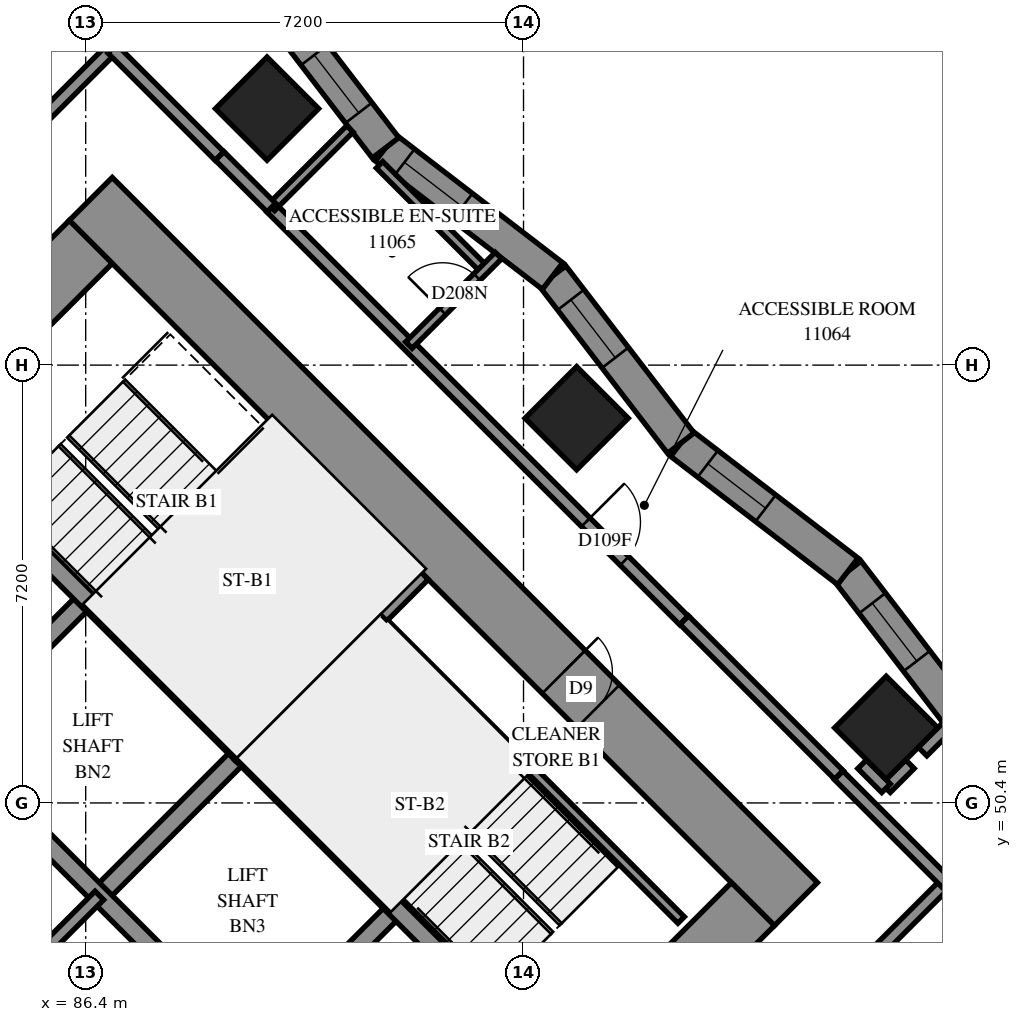
"""IFC4 building model, lengths in metres.
Left out: names, types, materials, properties, quantities, classifications, styles, units other than length and angle.
Written with IfcOpenShell. Run it as: python <this file> out.ifc"""

import sys

from ifc_helpers import new_model, si_unit, direction, frame, frame_2d, origin, origin_2d, place, context, subcontext, project, spatial, polyline, rectangle, outline, extrude, element, fill, save


model = new_model("IFC4")
c1 = context("Model", 3, precision=1e-05, world=origin(), true_north=direction((0.0, 1.0)))
c2 = subcontext(c1, "Body", "Model", "MODEL_VIEW")
j1 = project(units=[si_unit("LENGTHUNIT", "METRE"), si_unit("PLANEANGLEUNIT", "RADIAN")], contexts=[c1])
p1 = place(None, origin())
s1 = spatial("IfcSite", under=j1, at=p1, CompositionType="ELEMENT")
p2 = place(p1, origin())
s2 = spatial("IfcBuilding", under=s1, at=p2, CompositionType="ELEMENT")
p3 = place(p2, frame((0.0, 0.0, 44.0)))
s3 = spatial("IfcBuildingStorey", under=s2, at=p3, CompositionType="ELEMENT", Elevation=44.0)
for number, where, z_axis, x_axis in (
    (1, (89.382, 61.818, 0.0), (0.0, 0.0, 1.0), (0.707, -0.707, 0.0)),
    (2, (94.474, 56.727, 0.0), (0.0, 0.0, 1.0), (0.707, -0.707, 0.0)),
    (3, (99.565, 51.635, 0.0), (0.0, 0.0, 1.0), (0.707, -0.707, 0.0)),
):
    element("IfcColumn", number, at=place(p3, frame(where, z_axis=z_axis, x_axis=x_axis)), inside=s3, PredefinedType="COLUMN", context=c2, shape_type="SweptSolid", body=[
        extrude(rectangle(XDim=1.2, YDim=1.2, at=origin_2d()), origin(), (0.0, 0.0, 1.0), 3.1),
    ])
p4 = place(p3, frame((75.594, 49.443, -0.3), z_axis=(0.0, 0.0, 1.0), x_axis=(0.7071037324, -0.70710983, 0.0)))
e4 = element("IfcWall", 4, at=p4, inside=s3, PredefinedType="SHEAR", context=c2, shape_type="SweptSolid", body=[
    extrude(rectangle(XDim=16.4, YDim=1.0, at=frame_2d((8.2, 0.0))), origin(), (0.0, 0.0, 1.0), 2.7),
])
p5 = place(p3, frame((86.483, 60.333, -0.3), z_axis=(0.0, 0.0, 1.0), x_axis=(0.70710983, -0.7071037324, 0.0)))
e5 = element("IfcWall", 5, at=p5, inside=s3, PredefinedType="SHEAR", context=c2, shape_type="SweptSolid", body=[
    extrude(rectangle(XDim=16.4, YDim=1.0, at=frame_2d((8.2, 0.0))), origin(), (0.0, 0.0, 1.0), 2.7),
])
p6 = place(p5, frame((11.0, 0.0, 0.3)))
e6 = element("IfcOpeningElement", 6, at=p6, cuts=e5, PredefinedType="OPENING", context=c2, shape_type="SweptSolid", body=[
    extrude(rectangle(XDim=0.8, YDim=2.1, at=frame_2d((0.4, 1.05))), frame((0.0, 0.51, 0.0), z_axis=(0.0, -1.0, 0.0), x_axis=(1.0, 0.0, 0.0)), (0.0, 0.0, 1.0), 1.02),
])
p7 = place(p3, frame((76.301, 49.443, -0.3), z_axis=(0.0, 0.0, 1.0), x_axis=(0.7071067812, 0.7071067812, 0.0)))
e7 = element("IfcWall", 7, at=p7, inside=s3, PredefinedType="SHEAR", context=c2, shape_type="SweptSolid", body=[
    extrude(rectangle(XDim=14.4, YDim=1.0, at=frame_2d((7.2, 0.0))), origin(), (0.0, 0.0, 1.0), 2.7),
])
p8 = place(p7, frame((4.55, 0.0, 0.3)))
e8 = element("IfcOpeningElement", 8, at=p8, cuts=e7, PredefinedType="OPENING", context=c2, shape_type="SweptSolid", body=[
    extrude(rectangle(XDim=1.1, YDim=2.1, at=frame_2d((0.55, 1.05))), frame((0.0, 0.51, 0.0), z_axis=(0.0, -1.0, 0.0), x_axis=(1.0, 0.0, 0.0)), (0.0, 0.0, 1.0), 1.02),
])
p9 = place(p7, frame((11.35, 0.0, 0.3)))
e9 = element("IfcOpeningElement", 9, at=p9, cuts=e7, PredefinedType="OPENING", context=c2, shape_type="SweptSolid", body=[
    extrude(rectangle(XDim=1.1, YDim=2.1, at=frame_2d((0.55, 1.05))), frame((0.0, 0.51, 0.0), z_axis=(0.0, -1.0, 0.0), x_axis=(1.0, 0.0, 0.0)), (0.0, 0.0, 1.0), 1.02),
])
p10 = place(p3, frame((87.19, 38.554, -0.3), z_axis=(0.0, 0.0, 1.0), x_axis=(0.707103309, 0.7071102534, 0.0)))
e10 = element("IfcWall", 10, at=p10, inside=s3, PredefinedType="SHEAR", context=c2, shape_type="SweptSolid", body=[
    extrude(rectangle(XDim=14.4, YDim=1.0, at=frame_2d((7.2, 0.0))), origin(), (0.0, 0.0, 1.0), 2.7),
])
p11 = place(p10, frame((4.55, 0.0, 0.3)))
e11 = element("IfcOpeningElement", 11, at=p11, cuts=e10, PredefinedType="OPENING", context=c2, shape_type="SweptSolid", body=[
    extrude(rectangle(XDim=1.1, YDim=2.1, at=frame_2d((0.55, 1.05))), frame((0.0, 0.51, 0.0), z_axis=(0.0, -1.0, 0.0), x_axis=(1.0, 0.0, 0.0)), (0.0, 0.0, 1.0), 1.02),
])
p12 = place(p10, frame((11.35, 0.0, 0.3)))
e12 = element("IfcOpeningElement", 12, at=p12, cuts=e10, PredefinedType="OPENING", context=c2, shape_type="SweptSolid", body=[
    extrude(rectangle(XDim=1.1, YDim=2.1, at=frame_2d((0.55, 1.05))), frame((0.0, 0.51, 0.0), z_axis=(0.0, -1.0, 0.0), x_axis=(1.0, 0.0, 0.0)), (0.0, 0.0, 1.0), 1.02),
])
p13 = place(p3, frame((84.079, 51.423, 0.0), z_axis=(0.0, 0.0, 1.0), x_axis=(0.7071219326, 0.7070916295, 0.0)))
e13 = element("IfcWall", 13, at=p13, inside=s3, PredefinedType="SOLIDWALL", context=c2, shape_type="SweptSolid", body=[
    extrude(rectangle(XDim=3.3, YDim=0.3, at=frame_2d((1.65, 0.0))), origin(), (0.0, 0.0, 1.0), 3.1),
])
for number, where, z_axis, x_axis in (
    (14, (86.625, 48.878, 0.0), (0.0, 0.0, 1.0), (0.707, 0.707, 0.0)),
    (15, (89.17, 46.332, 0.0), (0.0, 0.0, 1.0), (0.707, 0.707, 0.0)),
):
    element("IfcWall", number, at=place(p3, frame(where, z_axis=z_axis, x_axis=x_axis)), inside=s3, PredefinedType="SOLIDWALL", context=c2, shape_type="SweptSolid", body=[
        extrude(rectangle(XDim=3.3, YDim=0.3, at=frame_2d((1.65, 0.0))), origin(), (0.0, 0.0, 1.0), 3.1),
    ])
p14 = place(p3, frame((78.988, 51.423, 0.0), z_axis=(0.0, 0.0, 1.0), x_axis=(0.7071067812, -0.7071067812, 0.0)))
e16 = element("IfcWall", 16, at=p14, inside=s3, PredefinedType="SOLIDWALL", context=c2, shape_type="SweptSolid", body=[
    extrude(rectangle(XDim=14.4, YDim=0.3, at=frame_2d((7.2, 0.0))), origin(), (0.0, 0.0, 1.0), 3.1),
])
p15 = place(p14, frame((1.25, 0.0, 0.0)))
e17 = element("IfcOpeningElement", 17, at=p15, cuts=e16, PredefinedType="OPENING", context=c2, shape_type="SweptSolid", body=[
    extrude(rectangle(XDim=1.1, YDim=2.1, at=frame_2d((0.55, 1.05))), frame((0.0, 0.16, 0.0), z_axis=(0.0, -1.0, 0.0), x_axis=(1.0, 0.0, 0.0)), (0.0, 0.0, 1.0), 0.32),
])
p16 = place(p14, frame((4.85, 0.0, 0.0)))
e18 = element("IfcOpeningElement", 18, at=p16, cuts=e16, PredefinedType="OPENING", context=c2, shape_type="SweptSolid", body=[
    extrude(rectangle(XDim=1.1, YDim=2.1, at=frame_2d((0.55, 1.05))), frame((0.0, 0.16, 0.0), z_axis=(0.0, -1.0, 0.0), x_axis=(1.0, 0.0, 0.0)), (0.0, 0.0, 1.0), 0.32),
])
p17 = place(p14, frame((8.45, 0.0, 0.0)))
e19 = element("IfcOpeningElement", 19, at=p17, cuts=e16, PredefinedType="OPENING", context=c2, shape_type="SweptSolid", body=[
    extrude(rectangle(XDim=1.1, YDim=2.1, at=frame_2d((0.55, 1.05))), frame((0.0, 0.16, 0.0), z_axis=(0.0, -1.0, 0.0), x_axis=(1.0, 0.0, 0.0)), (0.0, 0.0, 1.0), 0.32),
])
p18 = place(p14, frame((12.05, 0.0, 0.0)))
e20 = element("IfcOpeningElement", 20, at=p18, cuts=e16, PredefinedType="OPENING", context=c2, shape_type="SweptSolid", body=[
    extrude(rectangle(XDim=1.1, YDim=2.1, at=frame_2d((0.55, 1.05))), frame((0.0, 0.16, 0.0), z_axis=(0.0, -1.0, 0.0), x_axis=(1.0, 0.0, 0.0)), (0.0, 0.0, 1.0), 0.32),
])
p19 = place(p3, frame((81.534, 53.969, 0.0), z_axis=(0.0, 0.0, 1.0), x_axis=(0.707103309, -0.7071102534, 0.0)))
e21 = element("IfcWall", 21, at=p19, inside=s3, PredefinedType="SOLIDWALL", context=c2, shape_type="SweptSolid", body=[
    extrude(rectangle(XDim=14.4, YDim=0.3, at=frame_2d((7.2, 0.0))), origin(), (0.0, 0.0, 1.0), 3.1),
])
p20 = place(p19, frame((12.05, 0.0, 0.0)))
e22 = element("IfcOpeningElement", 22, at=p20, cuts=e21, PredefinedType="OPENING", context=c2, shape_type="SweptSolid", body=[
    extrude(rectangle(XDim=1.1, YDim=2.1, at=frame_2d((0.55, 1.05))), frame((0.0, 0.16, 0.0), z_axis=(0.0, -1.0, 0.0), x_axis=(1.0, 0.0, 0.0)), (0.0, 0.0, 1.0), 0.32),
])
for number, where, z_axis, x_axis in (
    (23, (83.867, 56.302, 0.0), (0.0, 0.0, 1.0), (0.707, -0.707, 0.0)),
    (24, (88.958, 51.211, 0.0), (0.0, 0.0, 1.0), (0.707, -0.707, 0.0)),
):
    element("IfcWall", number, at=place(p3, frame(where, z_axis=z_axis, x_axis=x_axis)), inside=s3, PredefinedType="SOLIDWALL", context=c2, shape_type="SweptSolid", body=[
        extrude(rectangle(XDim=7.2, YDim=0.3, at=frame_2d((3.6, 0.0))), origin(), (0.0, 0.0, 1.0), 3.1),
    ])
p21 = place(p3, frame((88.958, 51.211, 0.0), z_axis=(0.0, 0.0, 1.0), x_axis=(0.7071067812, 0.7071067812, 0.0)))
e25 = element("IfcWall", 25, at=p21, inside=s3, PredefinedType="SOLIDWALL", context=c2, shape_type="SweptSolid", body=[
    extrude(rectangle(XDim=4.2, YDim=0.3, at=frame_2d((2.1, 0.0))), origin(), (0.0, 0.0, 1.0), 3.1),
])
p22 = place(p3, frame((101.042, 51.462, 0.0), z_axis=(0.0, 0.0, 1.0), x_axis=(-0.6089722022, 0.7931915638, 0.0)))
e26 = element("IfcWall", 26, at=p22, inside=s3, PredefinedType="SOLIDWALL", context=c2, shape_type="SweptSolid", body=[
    extrude(outline(polyline([(0.036, -0.275), (3.499, -0.275), (3.427, 0.275), (-0.036, 0.275), (0.036, -0.275)])), origin(), (0.0, 0.0, 1.0), 3.1),
])
p23 = place(p22, frame((1.602, 0.0, 0.5)))
e27 = element("IfcOpeningElement", 27, at=p23, cuts=e26, PredefinedType="OPENING", context=c2, shape_type="SweptSolid", body=[
    extrude(rectangle(XDim=1.2, YDim=2.45, at=frame_2d((0.6, 1.225))), frame((0.0, 0.285, 0.0), z_axis=(0.0, -1.0, 0.0), x_axis=(1.0, 0.0, 0.0)), (0.0, 0.0, 1.0), 0.57),
])
p24 = place(p3, frame((98.934, 54.209, 0.0), z_axis=(0.0, 0.0, 1.0), x_axis=(-0.7931776144, 0.6089903711, 0.0)))
e28 = element("IfcWall", 28, at=p24, inside=s3, PredefinedType="SOLIDWALL", context=c2, shape_type="SweptSolid", body=[
    extrude(outline(polyline([(-0.036, -0.275), (3.427, -0.275), (3.499, 0.275), (0.036, 0.275), (-0.036, -0.275)])), origin(), (0.0, 0.0, 1.0), 3.1),
])
p25 = place(p24, frame((1.704, 0.0, 0.5)))
e29 = element("IfcOpeningElement", 29, at=p25, cuts=e28, PredefinedType="OPENING", context=c2, shape_type="SweptSolid", body=[
    extrude(rectangle(XDim=1.2, YDim=2.45, at=frame_2d((0.6, 1.225))), frame((0.0, 0.285, 0.0), z_axis=(0.0, -1.0, 0.0), x_axis=(1.0, 0.0, 0.0)), (0.0, 0.0, 1.0), 0.57),
])
p26 = place(p3, frame((96.187, 56.318, 0.0), z_axis=(0.0, 0.0, 1.0), x_axis=(-0.6089903711, 0.7931776144, 0.0)))
e30 = element("IfcWall", 30, at=p26, inside=s3, PredefinedType="SOLIDWALL", context=c2, shape_type="SweptSolid", body=[
    extrude(outline(polyline([(0.036, -0.275), (3.499, -0.275), (3.427, 0.275), (-0.036, 0.275), (0.036, -0.275)])), origin(), (0.0, 0.0, 1.0), 3.1),
])
p27 = place(p26, frame((1.77, 0.0, 0.5)))
e31 = element("IfcOpeningElement", 31, at=p27, cuts=e30, PredefinedType="OPENING", context=c2, shape_type="SweptSolid", body=[
    extrude(rectangle(XDim=1.2, YDim=2.45, at=frame_2d((0.6, 1.225))), frame((0.0, 0.285, 0.0), z_axis=(0.0, -1.0, 0.0), x_axis=(1.0, 0.0, 0.0)), (0.0, 0.0, 1.0), 0.57),
])
p28 = place(p3, frame((94.078, 59.065, 0.0), z_axis=(0.0, 0.0, 1.0), x_axis=(-0.7931776144, 0.6089903711, 0.0)))
e32 = element("IfcWall", 32, at=p28, inside=s3, PredefinedType="SOLIDWALL", context=c2, shape_type="SweptSolid", body=[
    extrude(outline(polyline([(-0.036, -0.275), (3.427, -0.275), (3.499, 0.275), (0.036, 0.275), (-0.036, -0.275)])), origin(), (0.0, 0.0, 1.0), 3.1),
])
p29 = place(p28, frame((1.872, 0.0, 0.5)))
e33 = element("IfcOpeningElement", 33, at=p29, cuts=e32, PredefinedType="OPENING", context=c2, shape_type="SweptSolid", body=[
    extrude(rectangle(XDim=1.2, YDim=2.45, at=frame_2d((0.6, 1.225))), frame((0.0, 0.285, 0.0), z_axis=(0.0, -1.0, 0.0), x_axis=(1.0, 0.0, 0.0)), (0.0, 0.0, 1.0), 0.57),
])
p30 = place(p3, frame((91.332, 61.173, 0.0), z_axis=(0.0, 0.0, 1.0), x_axis=(-0.6089903711, 0.7931776144, 0.0)))
e34 = element("IfcWall", 34, at=p30, inside=s3, PredefinedType="SOLIDWALL", context=c2, shape_type="SweptSolid", body=[
    extrude(outline(polyline([(0.036, -0.275), (3.499, -0.275), (3.427, 0.275), (-0.036, 0.275), (0.036, -0.275)])), origin(), (0.0, 0.0, 1.0), 3.1),
])
p31 = place(p30, frame((0.725, 0.0, 0.5)))
e35 = element("IfcOpeningElement", 35, at=p31, cuts=e34, PredefinedType="OPENING", context=c2, shape_type="SweptSolid", body=[
    extrude(rectangle(XDim=1.2, YDim=2.45, at=frame_2d((0.6, 1.225))), frame((0.0, 0.285, 0.0), z_axis=(0.0, -1.0, 0.0), x_axis=(1.0, 0.0, 0.0)), (0.0, 0.0, 1.0), 0.57),
])
p32 = place(p3, frame((91.313, 53.354, 0.0), z_axis=(0.0, 0.0, 1.0), x_axis=(0.7071140275, -0.7070995348, 0.0)))
e36 = element("IfcWall", 36, at=p32, inside=s3, PredefinedType="PARTITIONING", context=c2, shape_type="SweptSolid", body=[
    extrude(rectangle(XDim=6.9, YDim=0.15, at=frame_2d((3.45, 0.0))), origin(), (0.0, 0.0, 1.0), 3.1),
])
p33 = place(p3, frame((84.079, 46.332, 0.0), z_axis=(0.0, 0.0, 1.0), x_axis=(0.7071067812, 0.7071067812, 0.0)))
e37 = element("IfcWall", 37, at=p33, inside=s3, PredefinedType="PARTITIONING", context=c2, shape_type="SweptSolid", body=[
    extrude(rectangle(XDim=3.6, YDim=0.2, at=frame_2d((1.8, 0.0))), origin(), (0.0, 0.0, 1.0), 3.1),
])
p34 = place(p3, frame((94.367, 41.349, 0.0), z_axis=(0.0, 0.0, 1.0), x_axis=(0.7071109781, 0.7071025843, 0.0)))
e38 = element("IfcWall", 38, at=p34, inside=s3, PredefinedType="PARTITIONING", context=c2, shape_type="SweptSolid", body=[
    extrude(rectangle(XDim=11.914, YDim=0.2, at=frame_2d((5.957, 0.0))), origin(), (0.0, 0.0, 1.0), 3.1),
])
p35 = place(p3, frame((79.871, 55.843, 0.0), z_axis=(0.0, 0.0, 1.0), x_axis=(0.7071067812, 0.7071067812, 0.0)))
e39 = element("IfcWall", 39, at=p35, inside=s3, PredefinedType="PARTITIONING", context=c2, shape_type="SweptSolid", body=[
    extrude(rectangle(XDim=9.85, YDim=0.2, at=frame_2d((4.925, 0.0))), origin(), (0.0, 0.0, 1.0), 3.1),
])
p36 = place(p35, frame((1.135, 0.0, 0.0)))
e40 = element("IfcOpeningElement", 40, at=p36, cuts=e39, PredefinedType="OPENING", context=c2, shape_type="SweptSolid", body=[
    extrude(rectangle(XDim=1.0, YDim=2.1, at=frame_2d((0.5, 1.05))), frame((0.0, 0.11, 0.0), z_axis=(0.0, -1.0, 0.0), x_axis=(1.0, 0.0, 0.0)), (0.0, 0.0, 1.0), 0.22),
])
p37 = place(p3, frame((93.59, 42.126, 0.0), z_axis=(0.0, 0.0, 1.0), x_axis=(0.7071067812, 0.7071067812, 0.0)))
e41 = element("IfcWall", 41, at=p37, inside=s3, PredefinedType="PARTITIONING", context=c2, shape_type="SweptSolid", body=[
    extrude(rectangle(XDim=9.849, YDim=0.2, at=frame_2d((4.924, 0.0))), origin(), (0.0, 0.0, 1.0), 3.1),
])
p38 = place(p37, frame((0.148, 0.0, 0.0)))
e42 = element("IfcOpeningElement", 42, at=p38, cuts=e41, PredefinedType="OPENING", context=c2, shape_type="SweptSolid", body=[
    extrude(rectangle(XDim=1.0, YDim=2.1, at=frame_2d((0.5, 1.05))), frame((0.0, 0.11, 0.0), z_axis=(0.0, -1.0, 0.0), x_axis=(1.0, 0.0, 0.0)), (0.0, 0.0, 1.0), 0.22),
])
p39 = place(p3, frame((89.451, 60.189, 0.0), z_axis=(0.0, 0.0, 1.0), x_axis=(0.7071796965, -0.7070338583, 0.0)))
e43 = element("IfcWall", 43, at=p39, inside=s3, PredefinedType="PARTITIONING", context=c2, shape_type="SweptSolid", body=[
    extrude(rectangle(XDim=9.6, YDim=0.2, at=frame_2d((4.8, 0.0))), origin(), (0.0, 0.0, 1.0), 3.1),
])
p40 = place(p39, frame((7.315, 0.0, 0.0)))
e44 = element("IfcOpeningElement", 44, at=p40, cuts=e43, PredefinedType="OPENING", context=c2, shape_type="SweptSolid", body=[
    extrude(rectangle(XDim=0.9, YDim=2.1, at=frame_2d((0.45, 1.05))), frame((0.0, 0.11, 0.0), z_axis=(0.0, -1.0, 0.0), x_axis=(1.0, 0.0, 0.0)), (0.0, 0.0, 1.0), 0.22),
])
p41 = place(p3, frame((96.244, 53.406, 0.0), z_axis=(0.0, 0.0, 1.0), x_axis=(0.7068288851, -0.7073845681, 0.0)))
e45 = element("IfcWall", 45, at=p41, inside=s3, PredefinedType="PARTITIONING", context=c2, shape_type="SweptSolid", body=[
    extrude(rectangle(XDim=3.599, YDim=0.2, at=frame_2d((1.8, 0.0))), origin(), (0.0, 0.0, 1.0), 3.1),
])
p42 = place(p3, frame((98.783, 50.855, 0.0), z_axis=(0.0, 0.0, 1.0), x_axis=(0.7071067812, -0.7071067812, 0.0)))
e46 = element("IfcWall", 46, at=p42, inside=s3, PredefinedType="PARTITIONING", context=c2, shape_type="SweptSolid", body=[
    extrude(rectangle(XDim=2.5, YDim=0.2, at=frame_2d((1.25, 0.0))), origin(), (0.0, 0.0, 1.0), 3.1),
])
p43 = place(p3, frame((86.835, 62.803, 0.0), z_axis=(0.0, 0.0, 1.0), x_axis=(0.7071067812, -0.7071067812, 0.0)))
e47 = element("IfcWall", 47, at=p43, inside=s3, PredefinedType="PARTITIONING", context=c2, shape_type="SweptSolid", body=[
    extrude(rectangle(XDim=2.498, YDim=0.2, at=frame_2d((1.249, 0.0))), origin(), (0.0, 0.0, 1.0), 3.1),
])
p44 = place(p3, frame((91.233, 60.894, 0.0), z_axis=(0.0, 0.0, 1.0), x_axis=(0.7071272785, -0.7070862833, 0.0)))
e48 = element("IfcWall", 48, at=p44, inside=s3, PredefinedType="PARTITIONING", context=c2, shape_type="SweptSolid", body=[
    extrude(rectangle(XDim=2.439, YDim=0.15, at=frame_2d((1.22, 0.0))), origin(), (0.0, 0.0, 1.0), 3.1),
])
p45 = place(p3, frame((91.715, 57.929, 0.0), z_axis=(0.0, 0.0, 1.0), x_axis=(0.7070827712, 0.7071307904, 0.0)))
e49 = element("IfcWall", 49, at=p45, inside=s3, PredefinedType="PARTITIONING", context=c2, shape_type="SweptSolid", body=[
    extrude(rectangle(XDim=2.083, YDim=0.15, at=frame_2d((1.041, 0.0))), origin(), (0.0, 0.0, 1.0), 3.1),
])
p46 = place(p45, frame((0.784, 0.0, 0.0)))
e50 = element("IfcOpeningElement", 50, at=p46, cuts=e49, PredefinedType="OPENING", context=c2, shape_type="SweptSolid", body=[
    extrude(rectangle(XDim=0.8, YDim=2.1, at=frame_2d((0.4, 1.05))), frame((0.0, 0.085, 0.0), z_axis=(0.0, -1.0, 0.0), x_axis=(1.0, 0.0, 0.0)), (0.0, 0.0, 1.0), 0.17),
])
p47 = place(p3, frame((89.453, 60.193, 0.0), z_axis=(0.0, 0.0, 1.0), x_axis=(0.7071067812, 0.7071067812, 0.0)))
e51 = element("IfcWall", 51, at=p47, inside=s3, PredefinedType="PARTITIONING", context=c2, shape_type="SweptSolid", body=[
    extrude(rectangle(XDim=1.828, YDim=0.15, at=frame_2d((0.914, 0.0))), origin(), (0.0, 0.0, 1.0), 3.1),
])
p48 = place(p3, frame((88.603, 61.039, 0.0), z_axis=(0.0, 0.0, 1.0), x_axis=(0.7079391603, -0.7062734211, 0.0)))
e52 = element("IfcWall", 52, at=p48, inside=s3, PredefinedType="PARTITIONING", context=c2, shape_type="SweptSolid", body=[
    extrude(rectangle(XDim=1.201, YDim=0.2, at=frame_2d((0.6, 0.0))), origin(), (0.0, 0.0, 1.0), 3.1),
])
for number, where, z_axis, x_axis in (
    (53, (99.561, 50.643, 0.0), (0.0, 0.0, 1.0), (0.707, 0.707, 0.0)),
    (54, (99.168, 51.036, 0.0), (0.0, 0.0, 1.0), (0.707, -0.707, 0.0)),
):
    element("IfcWall", number, at=place(p3, frame(where, z_axis=z_axis, x_axis=x_axis)), inside=s3, PredefinedType="PARTITIONING", context=c2, shape_type="SweptSolid", body=[
        extrude(rectangle(XDim=0.557, YDim=0.2, at=frame_2d((0.279, 0.0))), origin(), (0.0, 0.0, 1.0), 3.1),
    ])
p49 = place(p3, frame((100.163, 51.245, 0.0), z_axis=(0.0, 0.0, 1.0), x_axis=(0.7071067812, 0.7071067812, 0.0)))
e55 = element("IfcWall", 55, at=p49, inside=s3, PredefinedType="PARTITIONING", context=c2, shape_type="SweptSolid", body=[
    extrude(rectangle(XDim=0.56, YDim=0.2, at=frame_2d((0.28, 0.0))), origin(), (0.0, 0.0, 1.0), 3.1),
])
p50 = place(p23, origin())
e56 = element("IfcWindow", 56, at=p50, inside=s3, PartitioningType="SINGLE_PANEL", PredefinedType="WINDOW", context=c2, shape_type="SweptSolid", body=[
    extrude(rectangle(XDim=1.2, YDim=2.45, at=frame_2d((0.6, 1.225))), frame((0.0, 0.155, 0.0), z_axis=(0.0, -1.0, 0.0), x_axis=(1.0, 0.0, 0.0)), (0.0, 0.0, 1.0), 0.06),
])
fill(e27, e56)
p51 = place(p25, origin())
e57 = element("IfcWindow", 57, at=p51, inside=s3, PartitioningType="SINGLE_PANEL", PredefinedType="WINDOW", context=c2, shape_type="SweptSolid", body=[
    extrude(rectangle(XDim=1.2, YDim=2.45, at=frame_2d((0.6, 1.225))), frame((0.0, 0.155, 0.0), z_axis=(0.0, -1.0, 0.0), x_axis=(1.0, 0.0, 0.0)), (0.0, 0.0, 1.0), 0.06),
])
fill(e29, e57)
p52 = place(p27, origin())
e58 = element("IfcWindow", 58, at=p52, inside=s3, PartitioningType="SINGLE_PANEL", PredefinedType="WINDOW", context=c2, shape_type="SweptSolid", body=[
    extrude(rectangle(XDim=1.2, YDim=2.45, at=frame_2d((0.6, 1.225))), frame((0.0, 0.155, 0.0), z_axis=(0.0, -1.0, 0.0), x_axis=(1.0, 0.0, 0.0)), (0.0, 0.0, 1.0), 0.06),
])
fill(e31, e58)
p53 = place(p29, origin())
e59 = element("IfcWindow", 59, at=p53, inside=s3, PartitioningType="SINGLE_PANEL", PredefinedType="WINDOW", context=c2, shape_type="SweptSolid", body=[
    extrude(rectangle(XDim=1.2, YDim=2.45, at=frame_2d((0.6, 1.225))), frame((0.0, 0.155, 0.0), z_axis=(0.0, -1.0, 0.0), x_axis=(1.0, 0.0, 0.0)), (0.0, 0.0, 1.0), 0.06),
])
fill(e33, e59)
p54 = place(p31, origin())
e60 = element("IfcWindow", 60, at=p54, inside=s3, PartitioningType="SINGLE_PANEL", PredefinedType="WINDOW", context=c2, shape_type="SweptSolid", body=[
    extrude(rectangle(XDim=1.2, YDim=2.45, at=frame_2d((0.6, 1.225))), frame((0.0, 0.155, 0.0), z_axis=(0.0, -1.0, 0.0), x_axis=(1.0, 0.0, 0.0)), (0.0, 0.0, 1.0), 0.06),
])
fill(e35, e60)
p55 = place(p6, origin())
e61 = element("IfcDoor", 61, at=p55, inside=s3, OperationType="SINGLE_SWING_RIGHT", PredefinedType="DOOR", context=c2, shape_type="SweptSolid", body=[
    extrude(rectangle(XDim=0.8, YDim=2.1, at=frame_2d((0.4, 1.05))), frame((0.0, -0.44, 0.0), z_axis=(0.0, -1.0, 0.0), x_axis=(1.0, 0.0, 0.0)), (0.0, 0.0, 1.0), 0.05),
])
fill(e6, e61)
p56 = place(p40, origin())
e62 = element("IfcDoor", 62, at=p56, inside=s3, OperationType="SINGLE_SWING_LEFT", PredefinedType="DOOR", context=c2, shape_type="SweptSolid", body=[
    extrude(rectangle(XDim=0.9, YDim=2.1, at=frame_2d((0.45, 1.05))), frame((0.0, 0.025, 0.0), z_axis=(0.0, -1.0, 0.0), x_axis=(1.0, 0.0, 0.0)), (0.0, 0.0, 1.0), 0.05),
])
fill(e44, e62)
p57 = place(p46, origin())
e63 = element("IfcDoor", 63, at=p57, inside=s3, OperationType="SINGLE_SWING_RIGHT", PredefinedType="DOOR", context=c2, shape_type="SweptSolid", body=[
    extrude(rectangle(XDim=0.8, YDim=2.1, at=frame_2d((0.4, 1.05))), frame((0.0, 0.025, 0.0), z_axis=(0.0, -1.0, 0.0), x_axis=(1.0, 0.0, 0.0)), (0.0, 0.0, 1.0), 0.05),
])
fill(e50, e63)
save(model, sys.argv[1])
